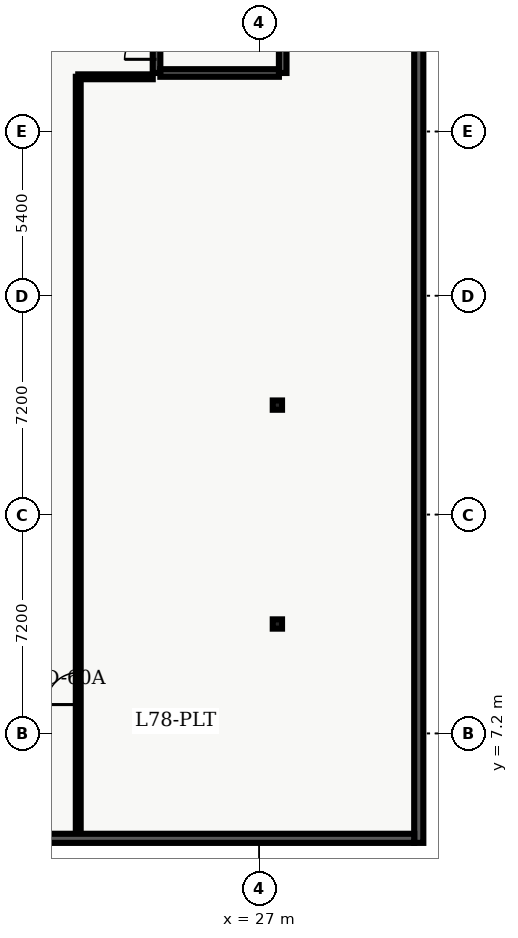
"""IFC4 building model, lengths in metres.
Left out: names, types, materials, properties, quantities, classifications, styles, units other than length and angle.
Written with IfcOpenShell. Run it as: python <this file> out.ifc"""

import sys

from ifc_helpers import new_model, entity, si_unit, converted_unit, direction, frame, origin_with_axes, origin_2d_with_axis, place, context, subcontext, project, spatial, polyline, rectangle, hollow_rectangle, outline, extrude, element, fill, save


model = new_model("IFC4")
c1 = context("Model", 3, precision=1e-05, world=origin_with_axes(), true_north=direction((0.0, 1.0)))
c2 = subcontext(c1, "Body", "Model", "MODEL_VIEW")
j1 = project(units=[si_unit("LENGTHUNIT", "METRE"), converted_unit("PLANEANGLEUNIT", "DEGREE", entity("IfcPlaneAngleMeasure", 0.017), si_unit("PLANEANGLEUNIT", "RADIAN"), dimensions=[0, 0, 0, 0, 0, 0, 0])], contexts=[c1])
p1 = place(None, origin_with_axes())
s1 = spatial("IfcSite", under=j1, at=p1, CompositionType="ELEMENT")
p2 = place(p1, origin_with_axes())
s2 = spatial("IfcBuilding", under=s1, at=p2, CompositionType="ELEMENT")
p3 = place(p2, frame((0.0, 0.0, 316.5), z_axis=(0.0, 0.0, 1.0), x_axis=(1.0, 0.0, 0.0)))
s3 = spatial("IfcBuildingStorey", under=s2, at=p3, CompositionType="ELEMENT", Elevation=316.5)
p4 = place(p3, frame((23.625, 28.925, 0.0), z_axis=(0.0, 0.0, 1.0), x_axis=(0.0, 1.0, 0.0)))
e1 = element("IfcWall", 1, at=p4, inside=s3, PredefinedType="SHEAR", context=c2, shape_type="SweptSolid", body=[
    extrude(outline(polyline([(0.0, -0.125), (8.65, -0.125), (8.65, 0.125), (0.0, 0.125), (0.0, -0.125)])), origin_with_axes(), (0.0, 0.0, 1.0), 3.64),
])
p5 = place(p4, frame((0.975, 0.0, 0.0), z_axis=(0.0, 0.0, 1.0), x_axis=(1.0, 0.0, 0.0)))
e2 = element("IfcOpeningElement", 2, at=p5, cuts=e1, PredefinedType="OPENING", context=c2, shape_type="SweptSolid", body=[
    extrude(rectangle(XDim=1.05, YDim=0.27, at=origin_2d_with_axis()), origin_with_axes(), (0.0, 0.0, 1.0), 2.15),
])
p6 = place(p3, frame((27.775, 28.925, 0.0), z_axis=(0.0, 0.0, 1.0), x_axis=(0.0, 1.0, 0.0)))
e3 = element("IfcWall", 3, at=p6, inside=s3, PredefinedType="SHEAR", context=c2, shape_type="SweptSolid", body=[
    extrude(outline(polyline([(0.0, -0.125), (8.65, -0.125), (8.65, 0.125), (0.0, 0.125), (0.0, -0.125)])), origin_with_axes(), (0.0, 0.0, 1.0), 3.64),
])
p7 = place(p3, frame((23.75, 28.925, 0.0), z_axis=(0.0, 0.0, 1.0), x_axis=(1.0, 0.0, 0.0)))
e4 = element("IfcWall", 4, at=p7, inside=s3, PredefinedType="SHEAR", context=c2, shape_type="SweptSolid", body=[
    extrude(outline(polyline([(0.0, -0.125), (3.9, -0.125), (3.9, 0.125), (0.0, 0.125), (0.0, -0.125)])), origin_with_axes(), (0.0, 0.0, 1.0), 3.64),
])
for number, where, z_axis, x_axis in (
    (5, (27.6, 10.8, 0.0), (0.0, 0.0, 1.0), (1.0, 0.0, 0.0)),
    (6, (27.6, 18.0, 0.0), (0.0, 0.0, 1.0), (1.0, 0.0, 0.0)),
):
    element("IfcColumn", number, at=place(p3, frame(where, z_axis=z_axis, x_axis=x_axis)), inside=s3, PredefinedType="COLUMN", context=c2, shape_type="SweptSolid", body=[
        extrude(hollow_rectangle(XDim=0.305, YDim=0.305, WallThickness=0.015, InnerFilletRadius=0.015, OuterFilletRadius=0.03, at=origin_2d_with_axis()), origin_with_axes(), (0.0, 0.0, 1.0), 3.9),
    ])
p8 = place(p3, frame((21.05, 3.895, 0.0), z_axis=(0.0, 0.0, 1.0), x_axis=(0.0, 1.0, 0.0)))
e7 = element("IfcWall", 7, at=p8, inside=s3, PredefinedType="PARTITIONING", context=c2, shape_type="SweptSolid", body=[
    extrude(outline(polyline([(0.0, -0.08), (24.905, -0.08), (24.905, 0.08), (0.0, 0.08), (0.0, -0.08)])), origin_with_axes(), (0.0, 0.0, 1.0), 2.68),
])
p9 = place(p8, frame((4.78, 0.0, 0.0), z_axis=(0.0, 0.0, 1.0), x_axis=(1.0, 0.0, 0.0)))
e8 = element("IfcOpeningElement", 8, at=p9, cuts=e7, PredefinedType="OPENING", context=c2, shape_type="SweptSolid", body=[
    extrude(rectangle(XDim=1.05, YDim=0.18, at=origin_2d_with_axis()), origin_with_axes(), (0.0, 0.0, 1.0), 2.15),
])
p10 = place(p3, frame((21.05, 28.8, 0.0), z_axis=(0.0, 0.0, 1.0), x_axis=(1.0, 0.0, 0.0)))
e9 = element("IfcWall", 9, at=p10, inside=s3, PredefinedType="PARTITIONING", context=c2, shape_type="SweptSolid", body=[
    extrude(outline(polyline([(0.0, -0.08), (2.45, -0.08), (2.45, 0.08), (0.0, 0.08), (0.0, -0.08)])), origin_with_axes(), (0.0, 0.0, 1.0), 2.68),
])
p11 = place(p3, frame((32.25, 31.0, 0.0), z_axis=(0.0, 0.0, 1.0), x_axis=(0.0, -1.0, 0.0)))
e10 = element("IfcWall", 10, at=p11, inside=s3, PredefinedType="SOLIDWALL", context=c2, shape_type="SweptSolid", body=[
    extrude(outline(polyline([(0.0, -0.15), (27.4, -0.15), (27.4, 0.15), (0.0, 0.15), (0.0, -0.15)])), origin_with_axes(), (0.0, 0.0, 1.0), 3.64),
])
p12 = place(p3, frame((32.1, 3.75, 0.0), z_axis=(0.0, 0.0, 1.0), x_axis=(-1.0, 0.0, 0.0)))
e11 = element("IfcWall", 11, at=p12, inside=s3, PredefinedType="SOLIDWALL", context=c2, shape_type="SweptSolid", body=[
    extrude(outline(polyline([(0.0, -0.15), (22.5, -0.15), (22.5, 0.15), (0.0, 0.15), (0.0, -0.15)])), origin_with_axes(), (0.0, 0.0, 1.0), 3.64),
])
p13 = place(p4, frame((0.975, 0.0, 0.0), z_axis=(0.0, 0.0, 1.0), x_axis=(1.0, 0.0, 0.0)))
e12 = element("IfcDoor", 12, at=p13, inside=s3, OperationType="SINGLE_SWING_LEFT", PredefinedType="DOOR", context=c2, shape_type="SweptSolid", body=[
    extrude(rectangle(XDim=1.05, YDim=0.09, at=origin_2d_with_axis()), origin_with_axes(), (0.0, 0.0, 1.0), 2.15),
])
fill(e2, e12)
p14 = place(p8, frame((4.78, 0.0, 0.0), z_axis=(0.0, 0.0, 1.0), x_axis=(1.0, 0.0, 0.0)))
e13 = element("IfcDoor", 13, at=p14, inside=s3, OperationType="SINGLE_SWING_LEFT", PredefinedType="DOOR", context=c2, shape_type="SweptSolid", body=[
    extrude(rectangle(XDim=1.05, YDim=0.09, at=origin_2d_with_axis()), origin_with_axes(), (0.0, 0.0, 1.0), 2.15),
])
fill(e8, e13)
save(model, sys.argv[1])
